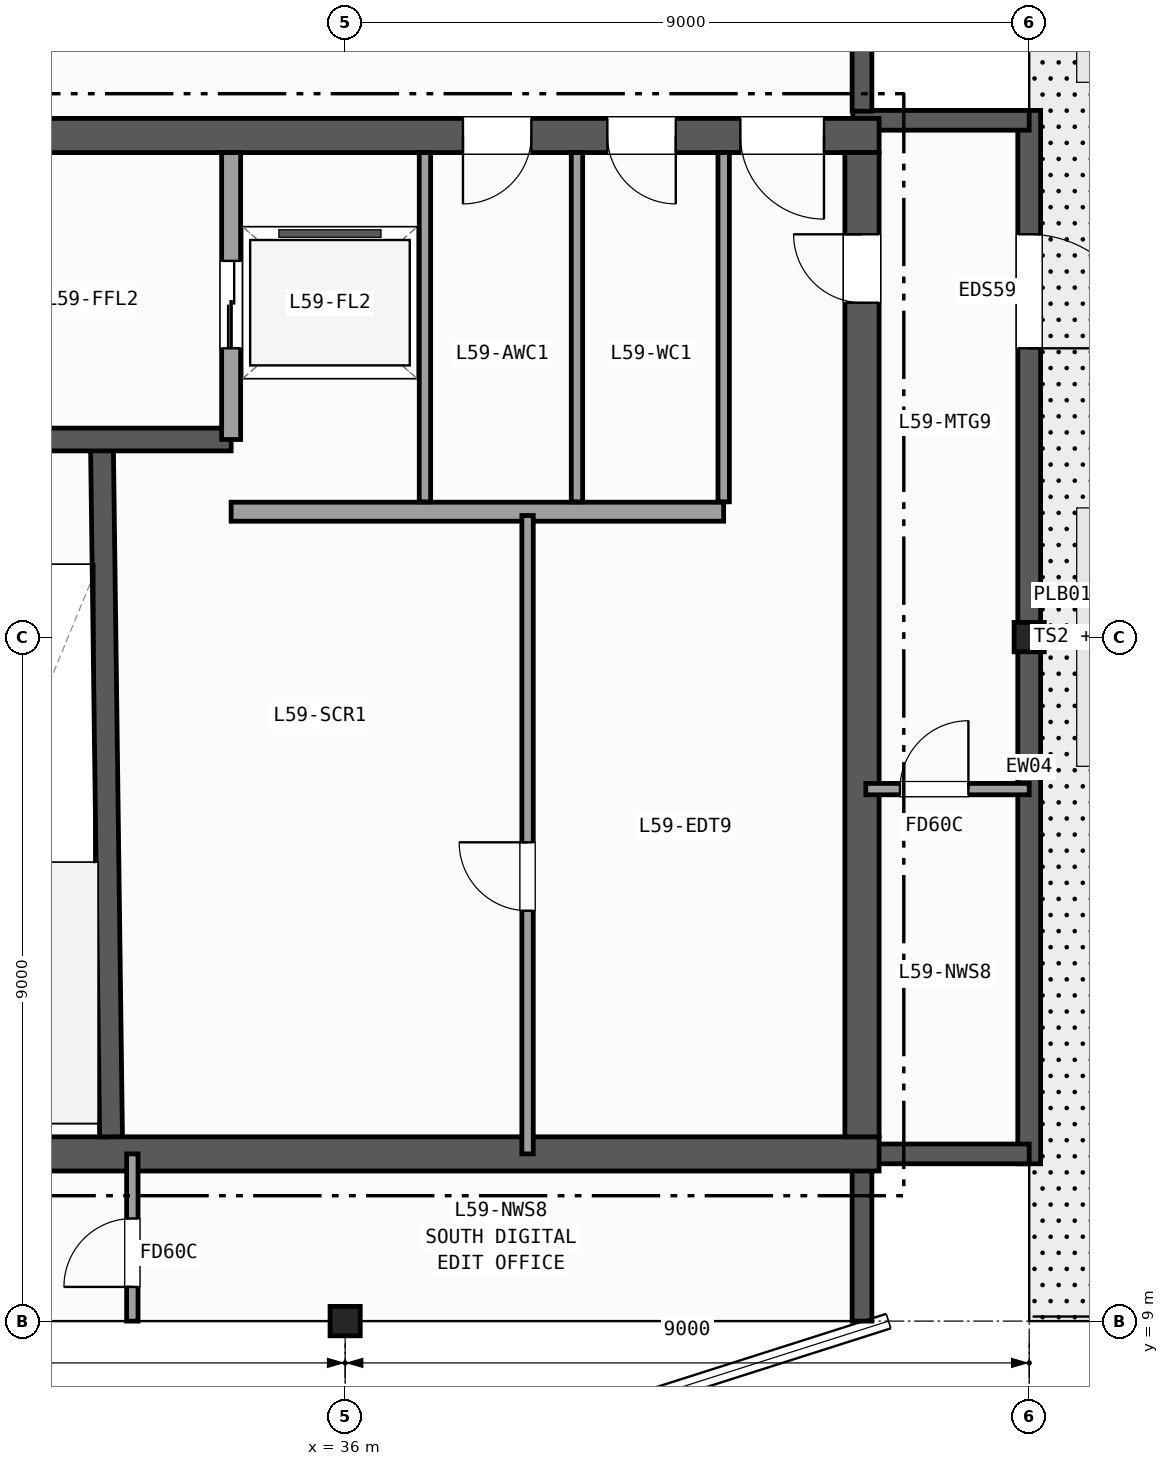
"""IFC4 building model, lengths in metres.
Left out: names, types, materials, properties, quantities, classifications, styles, units other than length and angle.
Written with IfcOpenShell. Run it as: python <this file> out.ifc"""

import sys

from ifc_helpers import new_model, si_unit, direction, frame, frame_2d, origin, origin_2d, place, context, subcontext, project, spatial, rectangle, i_section, extrude, element, fill, save


model = new_model("IFC4")
c1 = context("Model", 3, precision=1e-05, world=origin(), true_north=direction((0.0, 1.0)))
c2 = subcontext(c1, "Body", "Model", "MODEL_VIEW")
j1 = project(units=[si_unit("LENGTHUNIT", "METRE"), si_unit("PLANEANGLEUNIT", "RADIAN")], contexts=[c1])
p1 = place(None, origin())
s1 = spatial("IfcSite", under=j1, at=p1, CompositionType="ELEMENT")
p2 = place(p1, origin())
s2 = spatial("IfcBuilding", under=s1, at=p2, CompositionType="ELEMENT")
p3 = place(p2, frame((0.0, 0.0, 235.8)))
s3 = spatial("IfcBuildingStorey", under=s2, at=p3, CompositionType="ELEMENT", Elevation=235.8)
for number, where, z_axis, x_axis in (
    (1, (36.0, 9.0, 0.0), (0.0, 0.0, 1.0), (1.0, 0.0, 0.0)),
    (2, (45.0, 18.0, 0.0), (0.0, 0.0, 1.0), (1.0, 0.0, 0.0)),
):
    element("IfcColumn", number, at=place(p3, frame(where, z_axis=z_axis, x_axis=x_axis)), inside=s3, PredefinedType="COLUMN", context=c2, shape_type="SweptSolid", body=[
        extrude(i_section(OverallWidth=0.397, OverallDepth=0.387, WebThickness=0.021, FlangeThickness=0.033, FilletRadius=0.015, at=origin_2d()), origin(), (0.0, 0.0, 1.0), 5.0),
    ])
p4 = place(p3, frame((45.0, 24.93, 0.0), z_axis=(0.0, 0.0, 1.0), x_axis=(0.0, -1.0, 0.0)))
e3 = element("IfcWall", 3, at=p4, inside=s3, PredefinedType="SOLIDWALL", context=c2, shape_type="SweptSolid", body=[
    extrude(rectangle(XDim=13.86, YDim=0.3, at=frame_2d((6.93, 0.0))), origin(), (0.0, 0.0, 1.0), 4.72),
])
p5 = place(p4, frame((1.63, 0.0, 0.0)))
e4 = element("IfcOpeningElement", 4, at=p5, cuts=e3, PredefinedType="OPENING", context=c2, shape_type="SweptSolid", body=[
    extrude(rectangle(XDim=1.5, YDim=2.3, at=frame_2d((0.75, 1.15))), frame((0.0, 0.16, 0.0), z_axis=(0.0, -1.0, 0.0), x_axis=(1.0, 0.0, 0.0)), (0.0, 0.0, 1.0), 0.32),
])
p6 = place(p3, frame((42.8, 9.0, 0.0), z_axis=(0.0, 0.0, 1.0), x_axis=(0.0, 1.0, 0.0)))
e5 = element("IfcWall", 5, at=p6, inside=s3, PredefinedType="SOLIDWALL", context=c2, shape_type="SweptSolid", body=[
    extrude(rectangle(XDim=2.08, YDim=0.26, at=frame_2d((1.04, 0.0))), origin(), (0.0, 0.0, 1.0), 4.72),
])
for number, where, z_axis, x_axis in (
    (6, (42.68, 11.2, 0.0), (0.0, 0.0, 1.0), (1.0, 0.0, 0.0)),
    (7, (45.0, 24.8, 0.0), (0.0, 0.0, 1.0), (-1.0, 0.0, 0.0)),
):
    element("IfcWall", number, at=place(p3, frame(where, z_axis=z_axis, x_axis=x_axis)), inside=s3, PredefinedType="SOLIDWALL", context=c2, shape_type="SweptSolid", body=[
        extrude(rectangle(XDim=2.32, YDim=0.26, at=frame_2d((1.16, 0.0))), origin(), (0.0, 0.0, 1.0), 4.72),
    ])
p7 = place(p3, frame((42.8, 24.92, 0.0), z_axis=(0.0, 0.0, 1.0), x_axis=(0.0, 1.0, 0.0)))
e8 = element("IfcWall", 8, at=p7, inside=s3, PredefinedType="SOLIDWALL", context=c2, shape_type="SweptSolid", body=[
    extrude(rectangle(XDim=2.08, YDim=0.26, at=frame_2d((1.04, 0.0))), origin(), (0.0, 0.0, 1.0), 4.72),
])
p8 = place(p3, frame((29.175, 11.2, 0.0), z_axis=(0.0, 0.0, 1.0), x_axis=(1.0, 0.0, 0.0)))
e9 = element("IfcWall", 9, at=p8, inside=s3, PredefinedType="SHEAR", context=c2, shape_type="SweptSolid", body=[
    extrude(rectangle(XDim=13.85, YDim=0.45, at=frame_2d((6.925, 0.0))), origin(), (0.0, 0.0, 1.0), 4.72),
])
p9 = place(p3, frame((43.025, 24.6, 0.0), z_axis=(0.0, 0.0, 1.0), x_axis=(-1.0, 0.0, 0.0)))
e10 = element("IfcWall", 10, at=p9, inside=s3, PredefinedType="SHEAR", context=c2, shape_type="SweptSolid", body=[
    extrude(rectangle(XDim=13.85, YDim=0.45, at=frame_2d((6.925, 0.0))), origin(), (0.0, 0.0, 1.0), 4.72),
])
p10 = place(p9, frame((0.725, 0.0, 0.0)))
e11 = element("IfcOpeningElement", 11, at=p10, cuts=e10, PredefinedType="OPENING", context=c2, shape_type="SweptSolid", body=[
    extrude(rectangle(XDim=1.1, YDim=2.15, at=frame_2d((0.55, 1.075))), frame((0.0, 0.235, 0.0), z_axis=(0.0, -1.0, 0.0), x_axis=(1.0, 0.0, 0.0)), (0.0, 0.0, 1.0), 0.47),
])
p11 = place(p9, frame((2.675, 0.0, 0.0)))
e12 = element("IfcOpeningElement", 12, at=p11, cuts=e10, PredefinedType="OPENING", context=c2, shape_type="SweptSolid", body=[
    extrude(rectangle(XDim=0.9, YDim=2.1, at=frame_2d((0.45, 1.05))), frame((0.0, 0.235, 0.0), z_axis=(0.0, -1.0, 0.0), x_axis=(1.0, 0.0, 0.0)), (0.0, 0.0, 1.0), 0.47),
])
p12 = place(p9, frame((4.575, 0.0, 0.0)))
e13 = element("IfcOpeningElement", 13, at=p12, cuts=e10, PredefinedType="OPENING", context=c2, shape_type="SweptSolid", body=[
    extrude(rectangle(XDim=0.9, YDim=2.1, at=frame_2d((0.45, 1.05))), frame((0.0, 0.235, 0.0), z_axis=(0.0, -1.0, 0.0), x_axis=(1.0, 0.0, 0.0)), (0.0, 0.0, 1.0), 0.47),
])
p13 = place(p3, frame((42.8, 11.425, 0.0), z_axis=(0.0, 0.0, 1.0), x_axis=(0.0, 1.0, 0.0)))
e14 = element("IfcWall", 14, at=p13, inside=s3, PredefinedType="SHEAR", context=c2, shape_type="SweptSolid", body=[
    extrude(rectangle(XDim=12.95, YDim=0.45, at=frame_2d((6.475, 0.0))), origin(), (0.0, 0.0, 1.0), 4.72),
])
p14 = place(p13, frame((10.975, 0.0, 0.0)))
e15 = element("IfcOpeningElement", 15, at=p14, cuts=e14, PredefinedType="OPENING", context=c2, shape_type="SweptSolid", body=[
    extrude(rectangle(XDim=0.9, YDim=2.1, at=frame_2d((0.45, 1.05))), frame((0.0, 0.235, 0.0), z_axis=(0.0, -1.0, 0.0), x_axis=(1.0, 0.0, 0.0)), (0.0, 0.0, 1.0), 0.47),
])
p15 = place(p3, frame((32.92, 11.425, 0.0), z_axis=(0.0, 0.0, 1.0), x_axis=(-0.013135638869, 0.999913723774, 0.0)))
e16 = element("IfcWall", 16, at=p15, inside=s3, PredefinedType="SHEAR", context=c2, shape_type="SweptSolid", body=[
    extrude(rectangle(XDim=9.126, YDim=0.3, at=frame_2d((4.563, 0.0))), origin(), (0.0, 0.0, 1.0), 4.72),
])
p16 = place(p3, frame((34.5, 20.6, 0.0), z_axis=(0.0, 0.0, 1.0), x_axis=(-1.0, 0.0, 0.0)))
e17 = element("IfcWall", 17, at=p16, inside=s3, PredefinedType="SHEAR", context=c2, shape_type="SweptSolid", body=[
    extrude(rectangle(XDim=4.875, YDim=0.3, at=frame_2d((2.438, 0.0))), origin(), (0.0, 0.0, 1.0), 4.72),
])
p17 = place(p16, frame((2.7, 0.0, 0.0)))
e18 = element("IfcOpeningElement", 18, at=p17, cuts=e17, PredefinedType="OPENING", context=c2, shape_type="SweptSolid", body=[
    extrude(rectangle(XDim=1.2, YDim=2.15, at=frame_2d((0.6, 1.075))), frame((0.0, 0.16, 0.0), z_axis=(0.0, -1.0, 0.0), x_axis=(1.0, 0.0, 0.0)), (0.0, 0.0, 1.0), 0.32),
])
p18 = place(p3, frame((34.5, 20.6, 0.0), z_axis=(0.0, 0.0, 1.0), x_axis=(0.0, 1.0, 0.0)))
e19 = element("IfcWall", 19, at=p18, inside=s3, PredefinedType="PARTITIONING", context=c2, shape_type="SweptSolid", body=[
    extrude(rectangle(XDim=3.775, YDim=0.25, at=frame_2d((1.887, 0.0))), origin(), (0.0, 0.0, 1.0), 4.72),
])
p19 = place(p18, frame((1.2, 0.0, 0.0)))
e20 = element("IfcOpeningElement", 20, at=p19, cuts=e19, PredefinedType="OPENING", context=c2, shape_type="SweptSolid", body=[
    extrude(rectangle(XDim=1.15, YDim=2.15, at=frame_2d((0.575, 1.075))), frame((0.0, 0.135, 0.0), z_axis=(0.0, -1.0, 0.0), x_axis=(1.0, 0.0, 0.0)), (0.0, 0.0, 1.0), 0.27),
])
p20 = place(p3, frame((34.5, 19.65, 0.0), z_axis=(0.0, 0.0, 1.0), x_axis=(1.0, 0.0, 0.0)))
e21 = element("IfcWall", 21, at=p20, inside=s3, PredefinedType="PARTITIONING", context=c2, shape_type="SweptSolid", body=[
    extrude(rectangle(XDim=6.48, YDim=0.25, at=frame_2d((3.24, 0.0))), origin(), (0.0, 0.0, 1.0), 4.72),
])
p21 = place(p3, frame((38.4, 11.2, 0.0), z_axis=(0.0, 0.0, 1.0), x_axis=(0.0, 1.0, 0.0)))
e22 = element("IfcWall", 22, at=p21, inside=s3, PredefinedType="PARTITIONING", context=c2, shape_type="SweptSolid", body=[
    extrude(rectangle(XDim=8.4, YDim=0.15, at=frame_2d((4.2, 0.0))), origin(), (0.0, 0.0, 1.0), 4.72),
])
p22 = place(p21, frame((3.2, 0.0, 0.0)))
e23 = element("IfcOpeningElement", 23, at=p22, cuts=e22, PredefinedType="OPENING", context=c2, shape_type="SweptSolid", body=[
    extrude(rectangle(XDim=0.9, YDim=2.1, at=frame_2d((0.45, 1.05))), frame((0.0, 0.085, 0.0), z_axis=(0.0, -1.0, 0.0), x_axis=(1.0, 0.0, 0.0)), (0.0, 0.0, 1.0), 0.17),
])
for number, where, z_axis, x_axis in (
    (24, (37.05, 19.78, 0.0), (0.0, 0.0, 1.0), (0.0, 1.0, 0.0)),
    (25, (39.05, 19.78, 0.0), (0.0, 0.0, 1.0), (0.0, 1.0, 0.0)),
    (26, (40.98, 19.78, 0.0), (0.0, 0.0, 1.0), (0.0, 1.0, 0.0)),
):
    element("IfcWall", number, at=place(p3, frame(where, z_axis=z_axis, x_axis=x_axis)), inside=s3, PredefinedType="PARTITIONING", context=c2, shape_type="SweptSolid", body=[
        extrude(rectangle(XDim=4.595, YDim=0.15, at=frame_2d((2.297, 0.0))), origin(), (0.0, 0.0, 1.0), 4.72),
    ])
p23 = place(p3, frame((33.2, 9.0, 0.0), z_axis=(0.0, 0.0, 1.0), x_axis=(0.0, 1.0, 0.0)))
e27 = element("IfcWall", 27, at=p23, inside=s3, PredefinedType="PARTITIONING", context=c2, shape_type="SweptSolid", body=[
    extrude(rectangle(XDim=2.2, YDim=0.15, at=frame_2d((1.1, 0.0))), origin(), (0.0, 0.0, 1.0), 4.007),
])
p24 = place(p23, frame((0.45, 0.0, 0.0)))
e28 = element("IfcOpeningElement", 28, at=p24, cuts=e27, PredefinedType="OPENING", context=c2, shape_type="SweptSolid", body=[
    extrude(rectangle(XDim=0.9, YDim=2.1, at=frame_2d((0.45, 1.05))), frame((0.0, 0.085, 0.0), z_axis=(0.0, -1.0, 0.0), x_axis=(1.0, 0.0, 0.0)), (0.0, 0.0, 1.0), 0.17),
])
p25 = place(p3, frame((42.85, 16.0, 0.0), z_axis=(0.0, 0.0, 1.0), x_axis=(1.0, 0.0, 0.0)))
e29 = element("IfcWall", 29, at=p25, inside=s3, PredefinedType="PARTITIONING", context=c2, shape_type="SweptSolid", body=[
    extrude(rectangle(XDim=2.15, YDim=0.15, at=frame_2d((1.075, 0.0))), origin(), (0.0, 0.0, 1.0), 4.72),
])
p26 = place(p25, frame((0.45, 0.0, 0.0)))
e30 = element("IfcOpeningElement", 30, at=p26, cuts=e29, PredefinedType="OPENING", context=c2, shape_type="SweptSolid", body=[
    extrude(rectangle(XDim=0.9, YDim=2.1, at=frame_2d((0.45, 1.05))), frame((0.0, 0.085, 0.0), z_axis=(0.0, -1.0, 0.0), x_axis=(1.0, 0.0, 0.0)), (0.0, 0.0, 1.0), 0.17),
])
p27 = place(p5, origin())
e31 = element("IfcDoor", 31, at=p27, inside=s3, OperationType="SINGLE_SWING_RIGHT", PredefinedType="DOOR", context=c2, shape_type="SweptSolid", body=[
    extrude(rectangle(XDim=1.5, YDim=2.3, at=frame_2d((0.75, 1.15))), frame((0.0, 0.025, 0.0), z_axis=(0.0, -1.0, 0.0), x_axis=(1.0, 0.0, 0.0)), (0.0, 0.0, 1.0), 0.05),
])
fill(e4, e31)
p28 = place(p14, origin())
e32 = element("IfcDoor", 32, at=p28, inside=s3, OperationType="SINGLE_SWING_RIGHT", PredefinedType="DOOR", context=c2, shape_type="SweptSolid", body=[
    extrude(rectangle(XDim=0.9, YDim=2.1, at=frame_2d((0.45, 1.05))), frame((0.0, 0.025, 0.0), z_axis=(0.0, -1.0, 0.0), x_axis=(1.0, 0.0, 0.0)), (0.0, 0.0, 1.0), 0.05),
])
fill(e15, e32)
p29 = place(p10, origin())
e33 = element("IfcDoor", 33, at=p29, inside=s3, OperationType="SINGLE_SWING_LEFT", PredefinedType="DOOR", context=c2, shape_type="SweptSolid", body=[
    extrude(rectangle(XDim=1.1, YDim=2.15, at=frame_2d((0.55, 1.075))), frame((0.0, 0.025, 0.0), z_axis=(0.0, -1.0, 0.0), x_axis=(1.0, 0.0, 0.0)), (0.0, 0.0, 1.0), 0.05),
])
fill(e11, e33)
p30 = place(p11, origin())
e34 = element("IfcDoor", 34, at=p30, inside=s3, OperationType="SINGLE_SWING_LEFT", PredefinedType="DOOR", context=c2, shape_type="SweptSolid", body=[
    extrude(rectangle(XDim=0.9, YDim=2.1, at=frame_2d((0.45, 1.05))), frame((0.0, 0.025, 0.0), z_axis=(0.0, -1.0, 0.0), x_axis=(1.0, 0.0, 0.0)), (0.0, 0.0, 1.0), 0.05),
])
fill(e12, e34)
p31 = place(p12, origin())
e35 = element("IfcDoor", 35, at=p31, inside=s3, OperationType="SINGLE_SWING_RIGHT", PredefinedType="DOOR", context=c2, shape_type="SweptSolid", body=[
    extrude(rectangle(XDim=0.9, YDim=2.1, at=frame_2d((0.45, 1.05))), frame((0.0, 0.025, 0.0), z_axis=(0.0, -1.0, 0.0), x_axis=(1.0, 0.0, 0.0)), (0.0, 0.0, 1.0), 0.05),
])
fill(e13, e35)
p32 = place(p19, origin())
e36 = element("IfcDoor", 36, at=p32, inside=s3, OperationType="DOUBLE_DOOR_SLIDING", PredefinedType="DOOR", context=c2, shape_type="SweptSolid", body=[
    extrude(rectangle(XDim=1.15, YDim=2.15, at=frame_2d((0.575, 1.075))), frame((0.0, 0.025, 0.0), z_axis=(0.0, -1.0, 0.0), x_axis=(1.0, 0.0, 0.0)), (0.0, 0.0, 1.0), 0.05),
])
fill(e20, e36)
p33 = place(p22, origin())
e37 = element("IfcDoor", 37, at=p33, inside=s3, OperationType="SINGLE_SWING_RIGHT", PredefinedType="DOOR", context=c2, shape_type="SweptSolid", body=[
    extrude(rectangle(XDim=0.9, YDim=2.1, at=frame_2d((0.45, 1.05))), frame((0.0, 0.025, 0.0), z_axis=(0.0, -1.0, 0.0), x_axis=(1.0, 0.0, 0.0)), (0.0, 0.0, 1.0), 0.05),
])
fill(e23, e37)
p34 = place(p24, origin())
e38 = element("IfcDoor", 38, at=p34, inside=s3, OperationType="SINGLE_SWING_LEFT", PredefinedType="DOOR", context=c2, shape_type="SweptSolid", body=[
    extrude(rectangle(XDim=0.9, YDim=2.1, at=frame_2d((0.45, 1.05))), frame((0.0, 0.025, 0.0), z_axis=(0.0, -1.0, 0.0), x_axis=(1.0, 0.0, 0.0)), (0.0, 0.0, 1.0), 0.05),
])
fill(e28, e38)
p35 = place(p26, origin())
e39 = element("IfcDoor", 39, at=p35, inside=s3, OperationType="SINGLE_SWING_RIGHT", PredefinedType="DOOR", context=c2, shape_type="SweptSolid", body=[
    extrude(rectangle(XDim=0.9, YDim=2.1, at=frame_2d((0.45, 1.05))), frame((0.0, 0.025, 0.0), z_axis=(0.0, -1.0, 0.0), x_axis=(1.0, 0.0, 0.0)), (0.0, 0.0, 1.0), 0.05),
])
fill(e30, e39)
save(model, sys.argv[1])
